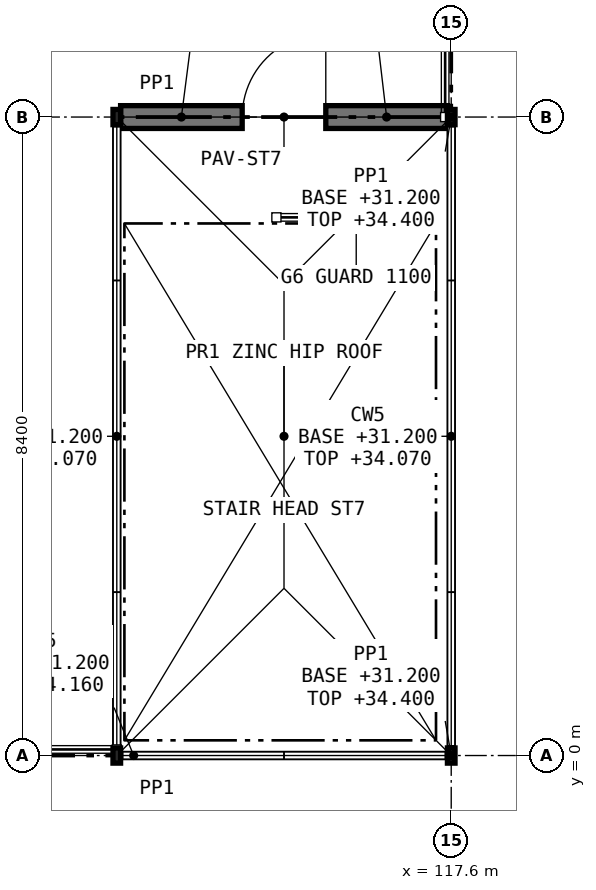
"""IFC4 building model, lengths in metres.
Left out: names, types, materials, properties, quantities, classifications, styles, units other than length and angle.
Written with IfcOpenShell. Run it as: python <this file> out.ifc"""

import sys

from ifc_helpers import new_model, si_unit, direction, frame, frame_2d, origin, origin_2d, place, context, subcontext, project, spatial, rectangle, hollow_rectangle, extrude, element, fill, save


model = new_model("IFC4")
c1 = context("Model", 3, precision=1e-05, world=origin(), true_north=direction((0.0, 1.0)))
c2 = subcontext(c1, "Body", "Model", "MODEL_VIEW")
j1 = project(units=[si_unit("LENGTHUNIT", "METRE"), si_unit("PLANEANGLEUNIT", "RADIAN")], contexts=[c1])
p1 = place(None, origin())
s1 = spatial("IfcSite", under=j1, at=p1, CompositionType="ELEMENT")
p2 = place(p1, origin())
s2 = spatial("IfcBuilding", under=s1, at=p2, CompositionType="ELEMENT")
p3 = place(p2, frame((0.0, 0.0, 31.2)))
s3 = spatial("IfcBuildingStorey", under=s2, at=p3, CompositionType="ELEMENT", Elevation=31.2)
p4 = place(p3, frame((113.2, 0.0, -0.2), z_axis=(0.0, 0.0, 1.0), x_axis=(1.0, 0.0, 0.0)))
e1 = element("IfcColumn", 1, at=p4, inside=s3, PredefinedType="COLUMN", context=c2, shape_type="SweptSolid", body=[
    extrude(hollow_rectangle(XDim=0.1, YDim=0.2, WallThickness=0.008, at=origin_2d()), origin(), (0.0, 0.0, 1.0), 3.4),
])
p5 = place(p3, frame((117.6, 0.0, 0.0), z_axis=(0.0, 0.0, 1.0), x_axis=(1.0, 0.0, 0.0)))
e2 = element("IfcColumn", 2, at=p5, inside=s3, PredefinedType="COLUMN", context=c2, shape_type="SweptSolid", body=[
    extrude(hollow_rectangle(XDim=0.1, YDim=0.2, WallThickness=0.008, at=origin_2d()), origin(), (0.0, 0.0, 1.0), 3.2),
])
p6 = place(p3, frame((113.2, 8.4, -0.2), z_axis=(0.0, 0.0, 1.0), x_axis=(1.0, 0.0, 0.0)))
e3 = element("IfcColumn", 3, at=p6, inside=s3, PredefinedType="COLUMN", context=c2, shape_type="SweptSolid", body=[
    extrude(hollow_rectangle(XDim=0.1, YDim=0.2, WallThickness=0.008, at=origin_2d()), origin(), (0.0, 0.0, 1.0), 3.4),
])
p7 = place(p3, frame((117.6, 8.4, 0.0), z_axis=(0.0, 0.0, 1.0), x_axis=(1.0, 0.0, 0.0)))
e4 = element("IfcColumn", 4, at=p7, inside=s3, PredefinedType="COLUMN", context=c2, shape_type="SweptSolid", body=[
    extrude(hollow_rectangle(XDim=0.1, YDim=0.2, WallThickness=0.008, at=origin_2d()), origin(), (0.0, 0.0, 1.0), 3.2),
])
p8 = place(p3, frame((113.25, 8.4, 0.0), z_axis=(0.0, 0.0, 1.0), x_axis=(1.0, 0.0, 0.0)))
e5 = element("IfcWall", 5, at=p8, inside=s3, PredefinedType="STANDARD", context=c2, shape_type="SweptSolid", body=[
    extrude(rectangle(XDim=4.3, YDim=0.3, at=frame_2d((2.15, 0.0))), origin(), (0.0, 0.0, 1.0), 3.2),
])
p9 = place(p8, frame((1.6, 0.0, 0.0)))
e6 = element("IfcOpeningElement", 6, at=p9, cuts=e5, PredefinedType="OPENING", context=c2, shape_type="SweptSolid", body=[
    extrude(rectangle(XDim=1.1, YDim=2.1, at=frame_2d((0.55, 1.05))), frame((0.0, 0.16, 0.0), z_axis=(0.0, -1.0, 0.0), x_axis=(1.0, 0.0, 0.0)), (0.0, 0.0, 1.0), 0.32),
])
p10 = place(p9, origin())
e7 = element("IfcDoor", 7, at=p10, inside=s3, OperationType="SINGLE_SWING_RIGHT", PredefinedType="DOOR", context=c2, shape_type="SweptSolid", body=[
    extrude(rectangle(XDim=1.1, YDim=2.1, at=frame_2d((0.55, 1.05))), frame((0.0, 0.025, 0.0), z_axis=(0.0, -1.0, 0.0), x_axis=(1.0, 0.0, 0.0)), (0.0, 0.0, 1.0), 0.05),
])
fill(e6, e7)
save(model, sys.argv[1])
